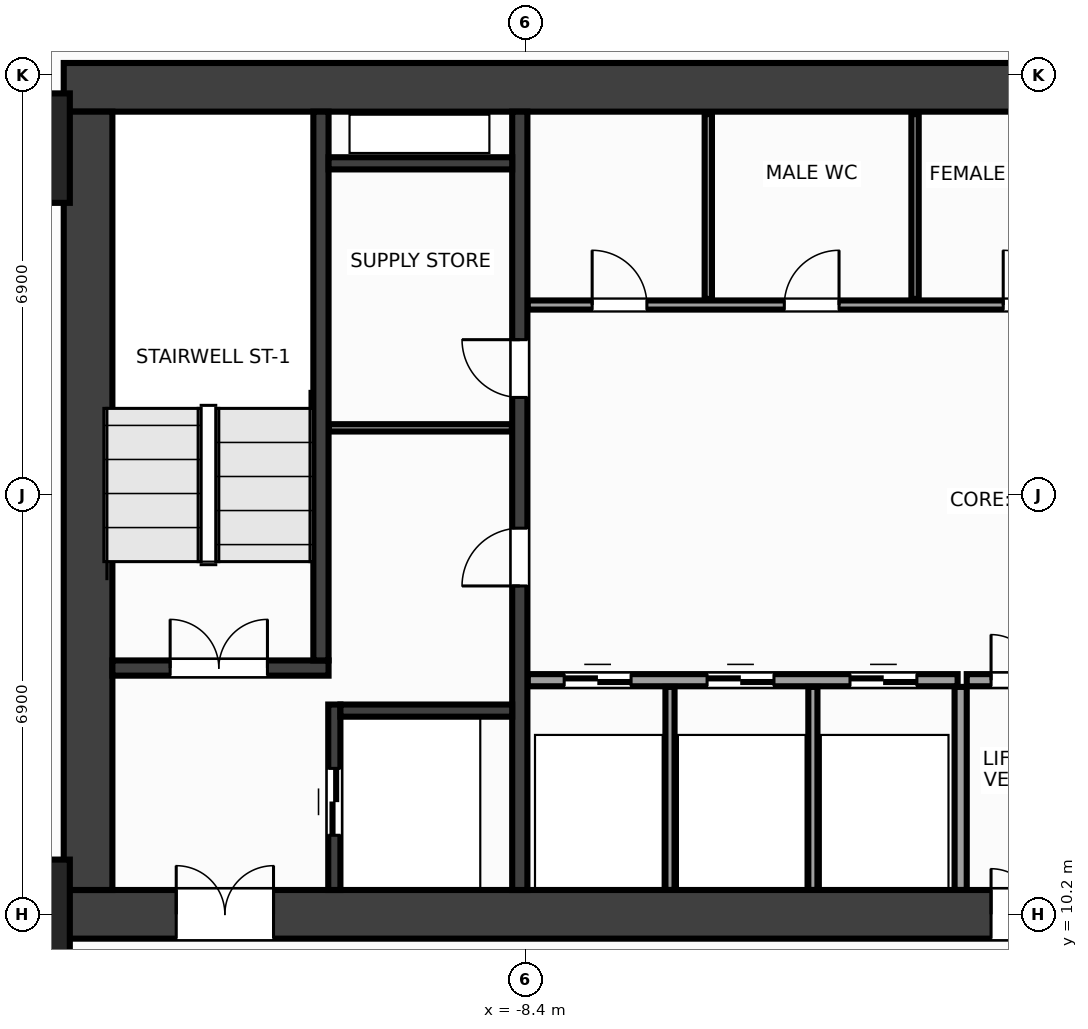
"""IFC4 building model, lengths in metres.
Left out: names, types, materials, properties, quantities, classifications, styles, units other than length and angle.
Written with IfcOpenShell. Run it as: python <this file> out.ifc"""

import sys

from ifc_helpers import new_model, si_unit, direction, frame, frame_2d, origin, origin_2d, place, context, subcontext, project, spatial, rectangle, extrude, source, transform, mapped, element, fill, save


model = new_model("IFC4")
c1 = context("Model", 3, precision=1e-05, world=origin(), true_north=direction((0.0, 1.0)))
c2 = subcontext(c1, "Body", "Model", "MODEL_VIEW")
j1 = project(units=[si_unit("LENGTHUNIT", "METRE"), si_unit("PLANEANGLEUNIT", "RADIAN")], contexts=[c1])
p1 = place(None, origin())
s1 = spatial("IfcSite", under=j1, at=p1, CompositionType="ELEMENT")
p2 = place(p1, origin())
s2 = spatial("IfcBuilding", under=s1, at=p2, CompositionType="ELEMENT")
p3 = place(p2, frame((0.0, 0.0, 34.4)))
s3 = spatial("IfcBuildingStorey", under=s2, at=p3, CompositionType="ELEMENT", Elevation=34.4)
m1 = source(origin(), c2, "Body", "SweptSolid", [
    extrude(rectangle(XDim=32.0, YDim=0.8, at=frame_2d((16.0, 0.0))), origin(), (0.0, 0.0, 1.0), 3.6),
])
p4 = place(p3, frame((-16.0, 23.8, 0.0), z_axis=(0.0, 0.0, 1.0), x_axis=(1.0, 0.0, 0.0)))
e1 = element("IfcWall", 1, at=p4, inside=s3, PredefinedType="SHEAR", context=c2, shape_type="MappedRepresentation", body=[
    mapped(m1, transform((0.0, 0.0, 0.0), x_axis=(1.0, 0.0, 0.0), y_axis=(0.0, 1.0, 0.0), z_axis=(0.0, 0.0, 1.0), scale=1.0)),
])
p5 = place(p3, frame((-16.0, 10.2, 0.0), z_axis=(0.0, 0.0, 1.0), x_axis=(1.0, 0.0, 0.0)))
e2 = element("IfcWall", 2, at=p5, inside=s3, PredefinedType="SHEAR", context=c2, shape_type="MappedRepresentation", body=[
    mapped(m1, transform((0.0, 0.0, 0.0), x_axis=(1.0, 0.0, 0.0), y_axis=(0.0, 1.0, 0.0), z_axis=(0.0, 0.0, 1.0), scale=1.0)),
])
p6 = place(p5, frame((1.85, 0.0, 0.0)))
e3 = element("IfcOpeningElement", 3, at=p6, cuts=e2, PredefinedType="OPENING", context=c2, shape_type="SweptSolid", body=[
    extrude(rectangle(XDim=1.6, YDim=2.15, at=frame_2d((0.8, 1.075))), frame((0.0, 0.412, 0.0), z_axis=(0.0, -1.0, 0.0), x_axis=(1.0, 0.0, 0.0)), (0.0, 0.0, 1.0), 0.824),
])
p7 = place(p5, frame((28.55, 0.0, 0.0)))
e4 = element("IfcOpeningElement", 4, at=p7, cuts=e2, PredefinedType="OPENING", context=c2, shape_type="SweptSolid", body=[
    extrude(rectangle(XDim=1.6, YDim=2.15, at=frame_2d((0.8, 1.075))), frame((0.0, 0.412, 0.0), z_axis=(0.0, -1.0, 0.0), x_axis=(1.0, 0.0, 0.0)), (0.0, 0.0, 1.0), 0.824),
])
p8 = place(p5, frame((15.25, 0.0, 0.0)))
e5 = element("IfcOpeningElement", 5, at=p8, cuts=e2, PredefinedType="OPENING", context=c2, shape_type="SweptSolid", body=[
    extrude(rectangle(XDim=1.5, YDim=2.2, at=frame_2d((0.75, 1.1))), frame((0.0, 0.412, 0.0), z_axis=(0.0, -1.0, 0.0), x_axis=(1.0, 0.0, 0.0)), (0.0, 0.0, 1.0), 0.824),
])
m2 = source(origin(), c2, "Body", "SweptSolid", [
    extrude(rectangle(XDim=12.8, YDim=0.8, at=frame_2d((6.4, 0.0))), origin(), (0.0, 0.0, 1.0), 3.6),
])
p9 = place(p3, frame((-15.6, 10.6, 0.0), z_axis=(0.0, 0.0, 1.0), x_axis=(0.0, 1.0, 0.0)))
e6 = element("IfcWall", 6, at=p9, inside=s3, PredefinedType="SHEAR", context=c2, shape_type="MappedRepresentation", body=[
    mapped(m2, transform((0.0, 0.0, 0.0), x_axis=(1.0, 0.0, 0.0), y_axis=(0.0, 1.0, 0.0), z_axis=(0.0, 0.0, 1.0), scale=1.0)),
])
m3 = source(origin(), c2, "Body", "SweptSolid", [
    extrude(rectangle(XDim=12.8, YDim=0.25, at=frame_2d((6.4, 0.0))), origin(), (0.0, 0.0, 1.0), 3.6),
])
p10 = place(p3, frame((-8.5, 10.6, 0.0), z_axis=(0.0, 0.0, 1.0), x_axis=(0.0, 1.0, 0.0)))
e7 = element("IfcWall", 7, at=p10, inside=s3, PredefinedType="SHEAR", context=c2, shape_type="MappedRepresentation", body=[
    mapped(m3, transform((0.0, 0.0, 0.0), x_axis=(1.0, 0.0, 0.0), y_axis=(0.0, 1.0, 0.0), z_axis=(0.0, 0.0, 1.0), scale=1.0)),
])
p11 = place(p10, frame((5.0, 0.0, 0.0)))
e8 = element("IfcOpeningElement", 8, at=p11, cuts=e7, PredefinedType="OPENING", context=c2, shape_type="SweptSolid", body=[
    extrude(rectangle(XDim=0.95, YDim=2.15, at=frame_2d((0.475, 1.075))), frame((0.0, 0.137, 0.0), z_axis=(0.0, -1.0, 0.0), x_axis=(1.0, 0.0, 0.0)), (0.0, 0.0, 1.0), 0.274),
])
p12 = place(p10, frame((8.1, 0.0, 0.0)))
e9 = element("IfcOpeningElement", 9, at=p12, cuts=e7, PredefinedType="OPENING", context=c2, shape_type="SweptSolid", body=[
    extrude(rectangle(XDim=0.95, YDim=2.15, at=frame_2d((0.475, 1.075))), frame((0.0, 0.137, 0.0), z_axis=(0.0, -1.0, 0.0), x_axis=(1.0, 0.0, 0.0)), (0.0, 0.0, 1.0), 0.274),
])
m4 = source(origin(), c2, "Body", "SweptSolid", [
    extrude(rectangle(XDim=3.555, YDim=0.25, at=frame_2d((1.777, 0.0))), origin(), (0.0, 0.0, 1.0), 3.6),
])
p13 = place(p3, frame((-15.2, 14.25, 0.0), z_axis=(0.0, 0.0, 1.0), x_axis=(1.0, 0.0, 0.0)))
e10 = element("IfcWall", 10, at=p13, inside=s3, PredefinedType="SHEAR", context=c2, shape_type="MappedRepresentation", body=[
    mapped(m4, transform((0.0, 0.0, 0.0), x_axis=(1.0, 0.0, 0.0), y_axis=(0.0, 1.0, 0.0), z_axis=(0.0, 0.0, 1.0), scale=1.0)),
])
p14 = place(p13, frame((0.95, 0.0, 0.0)))
e11 = element("IfcOpeningElement", 11, at=p14, cuts=e10, PredefinedType="OPENING", context=c2, shape_type="SweptSolid", body=[
    extrude(rectangle(XDim=1.6, YDim=2.15, at=frame_2d((0.8, 1.075))), frame((0.0, 0.137, 0.0), z_axis=(0.0, -1.0, 0.0), x_axis=(1.0, 0.0, 0.0)), (0.0, 0.0, 1.0), 0.274),
])
m5 = source(origin(), c2, "Body", "SweptSolid", [
    extrude(rectangle(XDim=9.025, YDim=0.25, at=frame_2d((4.512, 0.0))), origin(), (0.0, 0.0, 1.0), 3.6),
])
p15 = place(p3, frame((-11.77, 14.375, 0.0), z_axis=(0.0, 0.0, 1.0), x_axis=(0.0, 1.0, 0.0)))
e12 = element("IfcWall", 12, at=p15, inside=s3, PredefinedType="SHEAR", context=c2, shape_type="MappedRepresentation", body=[
    mapped(m5, transform((0.0, 0.0, 0.0), x_axis=(1.0, 0.0, 0.0), y_axis=(0.0, 1.0, 0.0), z_axis=(0.0, 0.0, 1.0), scale=1.0)),
])
m6 = source(origin(), c2, "Body", "SweptSolid", [
    extrude(rectangle(XDim=3.05, YDim=0.2, at=frame_2d((1.525, 0.0))), origin(), (0.0, 0.0, 1.0), 3.6),
])
p16 = place(p3, frame((-11.55, 10.6, 0.0), z_axis=(0.0, 0.0, 1.0), x_axis=(0.0, 1.0, 0.0)))
e13 = element("IfcWall", 13, at=p16, inside=s3, PredefinedType="SHEAR", context=c2, shape_type="MappedRepresentation", body=[
    mapped(m6, transform((0.0, 0.0, 0.0), x_axis=(1.0, 0.0, 0.0), y_axis=(0.0, 1.0, 0.0), z_axis=(0.0, 0.0, 1.0), scale=1.0)),
])
p17 = place(p16, frame((0.9, 0.0, 0.0)))
e14 = element("IfcOpeningElement", 14, at=p17, cuts=e13, PredefinedType="OPENING", context=c2, shape_type="SweptSolid", body=[
    extrude(rectangle(XDim=1.1, YDim=2.15, at=frame_2d((0.55, 1.075))), frame((0.0, 0.112, 0.0), z_axis=(0.0, -1.0, 0.0), x_axis=(1.0, 0.0, 0.0)), (0.0, 0.0, 1.0), 0.224),
])
m7 = source(origin(), c2, "Body", "SweptSolid", [
    extrude(rectangle(XDim=2.825, YDim=0.2, at=frame_2d((1.413, 0.0))), origin(), (0.0, 0.0, 1.0), 3.6),
])
p18 = place(p3, frame((-11.45, 13.55, 0.0), z_axis=(0.0, 0.0, 1.0), x_axis=(1.0, 0.0, 0.0)))
e15 = element("IfcWall", 15, at=p18, inside=s3, PredefinedType="SHEAR", context=c2, shape_type="MappedRepresentation", body=[
    mapped(m7, transform((0.0, 0.0, 0.0), x_axis=(1.0, 0.0, 0.0), y_axis=(0.0, 1.0, 0.0), z_axis=(0.0, 0.0, 1.0), scale=1.0)),
])
m8 = source(origin(), c2, "Body", "SweptSolid", [
    extrude(rectangle(XDim=3.02, YDim=0.2, at=frame_2d((1.51, 0.0))), origin(), (0.0, 0.0, 1.0), 3.6),
])
p19 = place(p3, frame((-11.645, 22.55, 0.0), z_axis=(0.0, 0.0, 1.0), x_axis=(1.0, 0.0, 0.0)))
e16 = element("IfcWall", 16, at=p19, inside=s3, PredefinedType="SHEAR", context=c2, shape_type="MappedRepresentation", body=[
    mapped(m8, transform((0.0, 0.0, 0.0), x_axis=(1.0, 0.0, 0.0), y_axis=(0.0, 1.0, 0.0), z_axis=(0.0, 0.0, 1.0), scale=1.0)),
])
m9 = source(origin(), c2, "Body", "SweptSolid", [
    extrude(rectangle(XDim=1.8, YDim=1.8, at=origin_2d()), origin(), (0.0, 0.0, 1.0), 3.6),
])
for number, where, z_axis, x_axis in (
    (17, (-16.8, 10.2, 0.0), (0.0, 0.0, 1.0), (1.0, 0.0, 0.0)),
    (18, (-16.8, 22.8, 0.0), (0.0, 0.0, 1.0), (1.0, 0.0, 0.0)),
):
    element("IfcColumn", number, at=place(p3, frame(where, z_axis=z_axis, x_axis=x_axis)), inside=s3, PredefinedType="COLUMN", context=c2, shape_type="MappedRepresentation", body=[
        mapped(m9, transform((0.0, 0.0, 0.0), x_axis=(1.0, 0.0, 0.0), y_axis=(0.0, 1.0, 0.0), z_axis=(0.0, 0.0, 1.0), scale=1.0)),
    ])
m10 = source(origin(), c2, "Body", "SweptSolid", [
    extrude(rectangle(XDim=3.01, YDim=0.12, at=frame_2d((1.505, 0.0))), origin(), (0.0, 0.0, 1.0), 3.36),
])
p20 = place(p3, frame((-11.64, 18.2, 0.0), z_axis=(0.0, 0.0, 1.0), x_axis=(1.0, 0.0, 0.0)))
e19 = element("IfcWall", 19, at=p20, inside=s3, PredefinedType="PARTITIONING", context=c2, shape_type="MappedRepresentation", body=[
    mapped(m10, transform((0.0, 0.0, 0.0), x_axis=(1.0, 0.0, 0.0), y_axis=(0.0, 1.0, 0.0), z_axis=(0.0, 0.0, 1.0), scale=1.0)),
])
m11 = source(origin(), c2, "Body", "SweptSolid", [
    extrude(rectangle(XDim=7.07, YDim=0.2, at=frame_2d((3.535, 0.0))), origin(), (0.0, 0.0, 1.0), 3.36),
])
p21 = place(p3, frame((-8.37, 14.05, 0.0), z_axis=(0.0, 0.0, 1.0), x_axis=(1.0, 0.0, 0.0)))
e20 = element("IfcWall", 20, at=p21, inside=s3, PredefinedType="PARTITIONING", context=c2, shape_type="MappedRepresentation", body=[
    mapped(m11, transform((0.0, 0.0, 0.0), x_axis=(1.0, 0.0, 0.0), y_axis=(0.0, 1.0, 0.0), z_axis=(0.0, 0.0, 1.0), scale=1.0)),
])
p22 = place(p21, frame((0.6, 0.0, 0.0)))
e21 = element("IfcOpeningElement", 21, at=p22, cuts=e20, PredefinedType="OPENING", context=c2, shape_type="SweptSolid", body=[
    extrude(rectangle(XDim=1.1, YDim=2.15, at=frame_2d((0.55, 1.075))), frame((0.0, 0.112, 0.0), z_axis=(0.0, -1.0, 0.0), x_axis=(1.0, 0.0, 0.0)), (0.0, 0.0, 1.0), 0.224),
])
p23 = place(p21, frame((2.95, 0.0, 0.0)))
e22 = element("IfcOpeningElement", 22, at=p23, cuts=e20, PredefinedType="OPENING", context=c2, shape_type="SweptSolid", body=[
    extrude(rectangle(XDim=1.1, YDim=2.15, at=frame_2d((0.55, 1.075))), frame((0.0, 0.112, 0.0), z_axis=(0.0, -1.0, 0.0), x_axis=(1.0, 0.0, 0.0)), (0.0, 0.0, 1.0), 0.224),
])
p24 = place(p21, frame((5.3, 0.0, 0.0)))
e23 = element("IfcOpeningElement", 23, at=p24, cuts=e20, PredefinedType="OPENING", context=c2, shape_type="SweptSolid", body=[
    extrude(rectangle(XDim=1.1, YDim=2.15, at=frame_2d((0.55, 1.075))), frame((0.0, 0.112, 0.0), z_axis=(0.0, -1.0, 0.0), x_axis=(1.0, 0.0, 0.0)), (0.0, 0.0, 1.0), 0.224),
])
m12 = source(origin(), c2, "Body", "SweptSolid", [
    extrude(rectangle(XDim=3.34, YDim=0.2, at=frame_2d((1.67, 0.0))), origin(), (0.0, 0.0, 1.0), 3.36),
])
p25 = place(p3, frame((-1.25, 10.6, 0.0), z_axis=(0.0, 0.0, 1.0), x_axis=(0.0, 1.0, 0.0)))
e24 = element("IfcWall", 24, at=p25, inside=s3, PredefinedType="PARTITIONING", context=c2, shape_type="MappedRepresentation", body=[
    mapped(m12, transform((0.0, 0.0, 0.0), x_axis=(1.0, 0.0, 0.0), y_axis=(0.0, 1.0, 0.0), z_axis=(0.0, 0.0, 1.0), scale=1.0)),
])
m13 = source(origin(), c2, "Body", "SweptSolid", [
    extrude(rectangle(XDim=2.3, YDim=0.2, at=frame_2d((1.15, 0.0))), origin(), (0.0, 0.0, 1.0), 3.36),
])
p26 = place(p3, frame((-1.15, 14.05, 0.0), z_axis=(0.0, 0.0, 1.0), x_axis=(1.0, 0.0, 0.0)))
e25 = element("IfcWall", 25, at=p26, inside=s3, PredefinedType="PARTITIONING", context=c2, shape_type="MappedRepresentation", body=[
    mapped(m13, transform((0.0, 0.0, 0.0), x_axis=(1.0, 0.0, 0.0), y_axis=(0.0, 1.0, 0.0), z_axis=(0.0, 0.0, 1.0), scale=1.0)),
])
p27 = place(p26, frame((0.4, 0.0, 0.0)))
e26 = element("IfcOpeningElement", 26, at=p27, cuts=e25, PredefinedType="OPENING", context=c2, shape_type="SweptSolid", body=[
    extrude(rectangle(XDim=1.5, YDim=2.2, at=frame_2d((0.75, 1.1))), frame((0.0, 0.112, 0.0), z_axis=(0.0, -1.0, 0.0), x_axis=(1.0, 0.0, 0.0)), (0.0, 0.0, 1.0), 0.224),
])
m14 = source(origin(), c2, "Body", "SweptSolid", [
    extrude(rectangle(XDim=14.59, YDim=0.15, at=frame_2d((7.295, 0.0))), origin(), (0.0, 0.0, 1.0), 3.36),
])
p28 = place(p3, frame((-8.37, 20.22, 0.0), z_axis=(0.0, 0.0, 1.0), x_axis=(1.0, 0.0, 0.0)))
e27 = element("IfcWall", 27, at=p28, inside=s3, PredefinedType="PARTITIONING", context=c2, shape_type="MappedRepresentation", body=[
    mapped(m14, transform((0.0, 0.0, 0.0), x_axis=(1.0, 0.0, 0.0), y_axis=(0.0, 1.0, 0.0), z_axis=(0.0, 0.0, 1.0), scale=1.0)),
])
p29 = place(p28, frame((1.06, 0.0, 0.0)))
e28 = element("IfcOpeningElement", 28, at=p29, cuts=e27, PredefinedType="OPENING", context=c2, shape_type="SweptSolid", body=[
    extrude(rectangle(XDim=0.9, YDim=2.15, at=frame_2d((0.45, 1.075))), frame((0.0, 0.087, 0.0), z_axis=(0.0, -1.0, 0.0), x_axis=(1.0, 0.0, 0.0)), (0.0, 0.0, 1.0), 0.174),
])
p30 = place(p28, frame((4.22, 0.0, 0.0)))
e29 = element("IfcOpeningElement", 29, at=p30, cuts=e27, PredefinedType="OPENING", context=c2, shape_type="SweptSolid", body=[
    extrude(rectangle(XDim=0.9, YDim=2.15, at=frame_2d((0.45, 1.075))), frame((0.0, 0.087, 0.0), z_axis=(0.0, -1.0, 0.0), x_axis=(1.0, 0.0, 0.0)), (0.0, 0.0, 1.0), 0.174),
])
p31 = place(p28, frame((7.82, 0.0, 0.0)))
e30 = element("IfcOpeningElement", 30, at=p31, cuts=e27, PredefinedType="OPENING", context=c2, shape_type="SweptSolid", body=[
    extrude(rectangle(XDim=0.9, YDim=2.15, at=frame_2d((0.45, 1.075))), frame((0.0, 0.087, 0.0), z_axis=(0.0, -1.0, 0.0), x_axis=(1.0, 0.0, 0.0)), (0.0, 0.0, 1.0), 0.174),
])
p32 = place(p28, frame((11.87, 0.0, 0.0)))
e31 = element("IfcOpeningElement", 31, at=p32, cuts=e27, PredefinedType="OPENING", context=c2, shape_type="SweptSolid", body=[
    extrude(rectangle(XDim=0.9, YDim=2.15, at=frame_2d((0.45, 1.075))), frame((0.0, 0.087, 0.0), z_axis=(0.0, -1.0, 0.0), x_axis=(1.0, 0.0, 0.0)), (0.0, 0.0, 1.0), 0.174),
])
m15 = source(origin(), c2, "Body", "SweptSolid", [
    extrude(rectangle(XDim=3.34, YDim=0.15, at=frame_2d((1.67, 0.0))), origin(), (0.0, 0.0, 1.0), 3.36),
])
for number, where, z_axis, x_axis in (
    (32, (-6.03, 10.6, 0.0), (0.0, 0.0, 1.0), (0.0, 1.0, 0.0)),
    (33, (-3.68, 10.6, 0.0), (0.0, 0.0, 1.0), (0.0, 1.0, 0.0)),
):
    element("IfcWall", number, at=place(p3, frame(where, z_axis=z_axis, x_axis=x_axis)), inside=s3, PredefinedType="PARTITIONING", context=c2, shape_type="MappedRepresentation", body=[
        mapped(m15, transform((0.0, 0.0, 0.0), x_axis=(1.0, 0.0, 0.0), y_axis=(0.0, 1.0, 0.0), z_axis=(0.0, 0.0, 1.0), scale=1.0)),
    ])
m16 = source(origin(), c2, "Body", "SweptSolid", [
    extrude(rectangle(XDim=3.04, YDim=0.12, at=frame_2d((1.52, 0.0))), origin(), (0.0, 0.0, 1.0), 3.36),
])
for number, where, z_axis, x_axis in (
    (34, (-5.4, 20.32, 0.0), (0.0, 0.0, 1.0), (0.0, 1.0, 0.0)),
    (35, (-2.0, 20.32, 0.0), (0.0, 0.0, 1.0), (0.0, 1.0, 0.0)),
):
    element("IfcWall", number, at=place(p3, frame(where, z_axis=z_axis, x_axis=x_axis)), inside=s3, PredefinedType="PARTITIONING", context=c2, shape_type="MappedRepresentation", body=[
        mapped(m16, transform((0.0, 0.0, 0.0), x_axis=(1.0, 0.0, 0.0), y_axis=(0.0, 1.0, 0.0), z_axis=(0.0, 0.0, 1.0), scale=1.0)),
    ])
m17 = source(origin(), c2, "Body", "SweptSolid", [
    extrude(rectangle(XDim=1.6, YDim=2.15, at=frame_2d((0.8, 1.075))), frame((0.0, 0.025, 0.0), z_axis=(0.0, -1.0, 0.0), x_axis=(1.0, 0.0, 0.0)), (0.0, 0.0, 1.0), 0.05),
])
p33 = place(p14, origin())
e36 = element("IfcDoor", 36, at=p33, inside=s3, OperationType="DOUBLE_DOOR_SINGLE_SWING", PredefinedType="DOOR", context=c2, shape_type="MappedRepresentation", body=[
    mapped(m17, transform((0.0, 0.0, 0.0), x_axis=(1.0, 0.0, 0.0), y_axis=(0.0, 1.0, 0.0), z_axis=(0.0, 0.0, 1.0), scale=1.0)),
])
fill(e11, e36)
p34 = place(p6, origin())
e37 = element("IfcDoor", 37, at=p34, inside=s3, OperationType="DOUBLE_DOOR_SINGLE_SWING", PredefinedType="DOOR", context=c2, shape_type="MappedRepresentation", body=[
    mapped(m17, transform((0.0, 0.0, 0.0), x_axis=(1.0, 0.0, 0.0), y_axis=(0.0, 1.0, 0.0), z_axis=(0.0, 0.0, 1.0), scale=1.0)),
])
fill(e3, e37)
m18 = source(origin(), c2, "Body", "SweptSolid", [
    extrude(rectangle(XDim=1.1, YDim=2.15, at=frame_2d((0.55, 1.075))), frame((0.0, 0.025, 0.0), z_axis=(0.0, -1.0, 0.0), x_axis=(1.0, 0.0, 0.0)), (0.0, 0.0, 1.0), 0.05),
])
p35 = place(p17, origin())
e38 = element("IfcDoor", 38, at=p35, inside=s3, OperationType="DOUBLE_DOOR_SLIDING", PredefinedType="DOOR", context=c2, shape_type="MappedRepresentation", body=[
    mapped(m18, transform((0.0, 0.0, 0.0), x_axis=(1.0, 0.0, 0.0), y_axis=(0.0, 1.0, 0.0), z_axis=(0.0, 0.0, 1.0), scale=1.0)),
])
fill(e14, e38)
m19 = source(origin(), c2, "Body", "SweptSolid", [
    extrude(rectangle(XDim=0.95, YDim=2.15, at=frame_2d((0.475, 1.075))), frame((0.0, 0.025, 0.0), z_axis=(0.0, -1.0, 0.0), x_axis=(1.0, 0.0, 0.0)), (0.0, 0.0, 1.0), 0.05),
])
p36 = place(p11, origin())
e39 = element("IfcDoor", 39, at=p36, inside=s3, OperationType="SINGLE_SWING_LEFT", PredefinedType="DOOR", context=c2, shape_type="MappedRepresentation", body=[
    mapped(m19, transform((0.0, 0.0, 0.0), x_axis=(1.0, 0.0, 0.0), y_axis=(0.0, 1.0, 0.0), z_axis=(0.0, 0.0, 1.0), scale=1.0)),
])
fill(e8, e39)
p37 = place(p12, origin())
e40 = element("IfcDoor", 40, at=p37, inside=s3, OperationType="SINGLE_SWING_RIGHT", PredefinedType="DOOR", context=c2, shape_type="MappedRepresentation", body=[
    mapped(m19, transform((0.0, 0.0, 0.0), x_axis=(1.0, 0.0, 0.0), y_axis=(0.0, 1.0, 0.0), z_axis=(0.0, 0.0, 1.0), scale=1.0)),
])
fill(e9, e40)
p38 = place(p22, origin())
e41 = element("IfcDoor", 41, at=p38, inside=s3, OperationType="DOUBLE_DOOR_SLIDING", PredefinedType="DOOR", context=c2, shape_type="MappedRepresentation", body=[
    mapped(m18, transform((0.0, 0.0, 0.0), x_axis=(1.0, 0.0, 0.0), y_axis=(0.0, 1.0, 0.0), z_axis=(0.0, 0.0, 1.0), scale=1.0)),
])
fill(e21, e41)
p39 = place(p23, origin())
e42 = element("IfcDoor", 42, at=p39, inside=s3, OperationType="DOUBLE_DOOR_SLIDING", PredefinedType="DOOR", context=c2, shape_type="MappedRepresentation", body=[
    mapped(m18, transform((0.0, 0.0, 0.0), x_axis=(1.0, 0.0, 0.0), y_axis=(0.0, 1.0, 0.0), z_axis=(0.0, 0.0, 1.0), scale=1.0)),
])
fill(e22, e42)
p40 = place(p24, origin())
e43 = element("IfcDoor", 43, at=p40, inside=s3, OperationType="DOUBLE_DOOR_SLIDING", PredefinedType="DOOR", context=c2, shape_type="MappedRepresentation", body=[
    mapped(m18, transform((0.0, 0.0, 0.0), x_axis=(1.0, 0.0, 0.0), y_axis=(0.0, 1.0, 0.0), z_axis=(0.0, 0.0, 1.0), scale=1.0)),
])
fill(e23, e43)
m20 = source(origin(), c2, "Body", "SweptSolid", [
    extrude(rectangle(XDim=1.5, YDim=2.2, at=frame_2d((0.75, 1.1))), frame((0.0, 0.025, 0.0), z_axis=(0.0, -1.0, 0.0), x_axis=(1.0, 0.0, 0.0)), (0.0, 0.0, 1.0), 0.05),
])
p41 = place(p27, origin())
e44 = element("IfcDoor", 44, at=p41, inside=s3, OperationType="DOUBLE_DOOR_SINGLE_SWING", PredefinedType="DOOR", context=c2, shape_type="MappedRepresentation", body=[
    mapped(m20, transform((0.0, 0.0, 0.0), x_axis=(1.0, 0.0, 0.0), y_axis=(0.0, 1.0, 0.0), z_axis=(0.0, 0.0, 1.0), scale=1.0)),
])
fill(e26, e44)
p42 = place(p8, origin())
e45 = element("IfcDoor", 45, at=p42, inside=s3, OperationType="DOUBLE_DOOR_SINGLE_SWING", PredefinedType="DOOR", context=c2, shape_type="MappedRepresentation", body=[
    mapped(m20, transform((0.0, 0.0, 0.0), x_axis=(1.0, 0.0, 0.0), y_axis=(0.0, 1.0, 0.0), z_axis=(0.0, 0.0, 1.0), scale=1.0)),
])
fill(e5, e45)
m21 = source(origin(), c2, "Body", "SweptSolid", [
    extrude(rectangle(XDim=0.9, YDim=2.15, at=frame_2d((0.45, 1.075))), frame((0.0, 0.025, 0.0), z_axis=(0.0, -1.0, 0.0), x_axis=(1.0, 0.0, 0.0)), (0.0, 0.0, 1.0), 0.05),
])
p43 = place(p29, origin())
e46 = element("IfcDoor", 46, at=p43, inside=s3, OperationType="SINGLE_SWING_LEFT", PredefinedType="DOOR", context=c2, shape_type="MappedRepresentation", body=[
    mapped(m21, transform((0.0, 0.0, 0.0), x_axis=(1.0, 0.0, 0.0), y_axis=(0.0, 1.0, 0.0), z_axis=(0.0, 0.0, 1.0), scale=1.0)),
])
fill(e28, e46)
p44 = place(p30, origin())
e47 = element("IfcDoor", 47, at=p44, inside=s3, OperationType="SINGLE_SWING_RIGHT", PredefinedType="DOOR", context=c2, shape_type="MappedRepresentation", body=[
    mapped(m21, transform((0.0, 0.0, 0.0), x_axis=(1.0, 0.0, 0.0), y_axis=(0.0, 1.0, 0.0), z_axis=(0.0, 0.0, 1.0), scale=1.0)),
])
fill(e29, e47)
p45 = place(p31, origin())
e48 = element("IfcDoor", 48, at=p45, inside=s3, OperationType="SINGLE_SWING_LEFT", PredefinedType="DOOR", context=c2, shape_type="MappedRepresentation", body=[
    mapped(m21, transform((0.0, 0.0, 0.0), x_axis=(1.0, 0.0, 0.0), y_axis=(0.0, 1.0, 0.0), z_axis=(0.0, 0.0, 1.0), scale=1.0)),
])
fill(e30, e48)
save(model, sys.argv[1])
